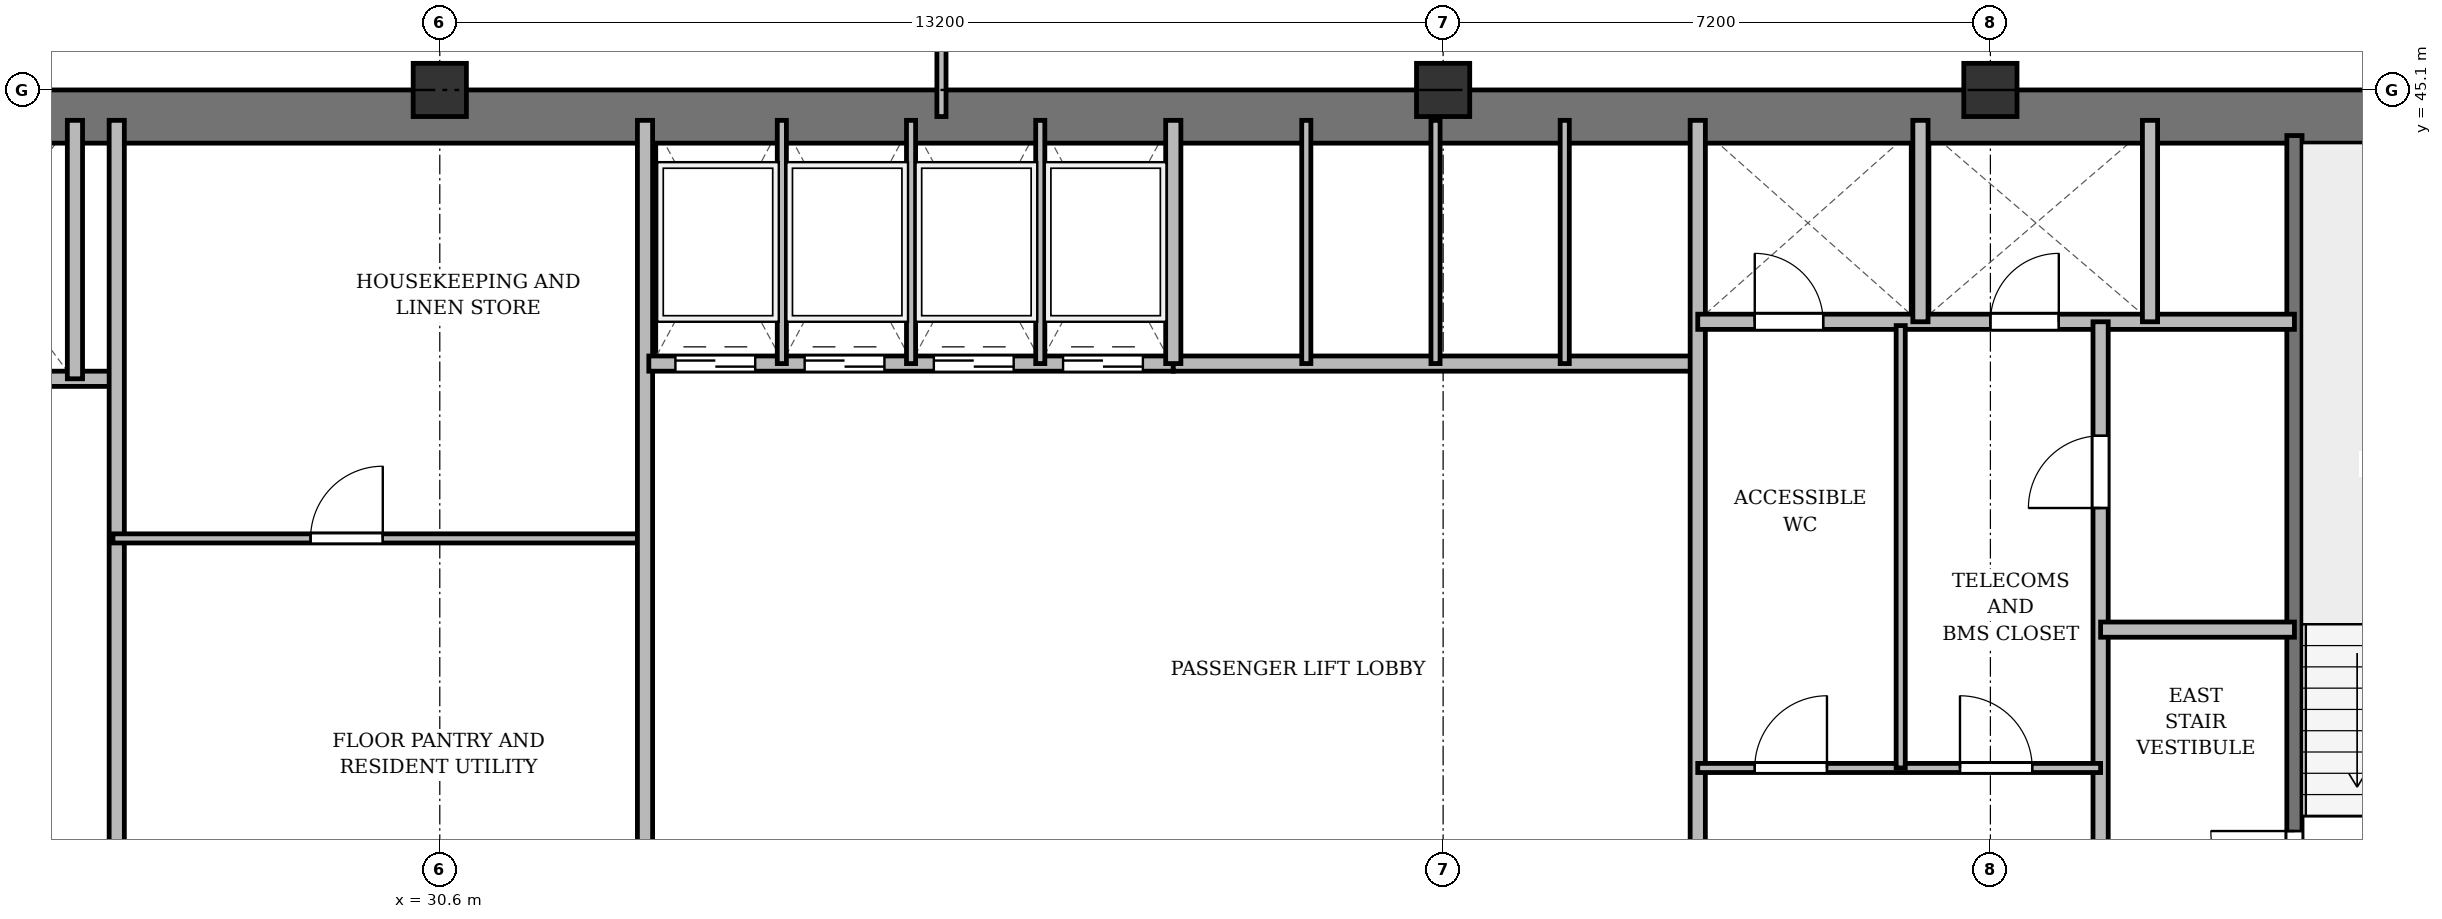
"""IFC4 building model, lengths in metres.
Left out: names, types, materials, properties, quantities, classifications, styles, units other than length and angle.
Written with IfcOpenShell. Run it as: python <this file> out.ifc"""

import sys

from ifc_helpers import new_model, si_unit, direction, frame, frame_2d, origin, origin_2d, place, context, subcontext, project, spatial, rectangle, extrude, source, transform, mapped, element, fill, save


model = new_model("IFC4")
c1 = context("Model", 3, precision=1e-05, world=origin(), true_north=direction((0.0, 1.0)))
c2 = subcontext(c1, "Body", "Model", "MODEL_VIEW")
j1 = project(units=[si_unit("LENGTHUNIT", "METRE"), si_unit("PLANEANGLEUNIT", "RADIAN")], contexts=[c1])
p1 = place(None, origin())
s1 = spatial("IfcSite", under=j1, at=p1, CompositionType="ELEMENT")
p2 = place(p1, origin())
s2 = spatial("IfcBuilding", under=s1, at=p2, CompositionType="ELEMENT")
p3 = place(p2, frame((0.0, 0.0, 139.3)))
s3 = spatial("IfcBuildingStorey", under=s2, at=p3, CompositionType="ELEMENT", Elevation=139.3)
m1 = source(origin(), c2, "Body", "SweptSolid", [
    extrude(rectangle(XDim=0.7, YDim=0.7, at=origin_2d()), origin(), (0.0, 0.0, 1.0), 3.6),
])
for number, where, z_axis, x_axis in (
    (1, (30.6, 45.1, 0.0), (0.0, 0.0, 1.0), (1.0, 0.0, 0.0)),
    (2, (43.8, 45.1, 0.0), (0.0, 0.0, 1.0), (1.0, 0.0, 0.0)),
    (3, (51.0, 45.1, 0.0), (0.0, 0.0, 1.0), (1.0, 0.0, 0.0)),
):
    element("IfcColumn", number, at=place(p3, frame(where, z_axis=z_axis, x_axis=x_axis)), inside=s3, PredefinedType="COLUMN", context=c2, shape_type="MappedRepresentation", body=[
        mapped(m1, transform((0.0, 0.0, 0.0), x_axis=(1.0, 0.0, 0.0), y_axis=(0.0, 1.0, 0.0), z_axis=(0.0, 0.0, 1.0), scale=1.0)),
    ])
p4 = place(p3, frame((15.5, 44.75, 0.0), z_axis=(0.0, 0.0, 1.0), x_axis=(1.0, 0.0, 0.0)))
e4 = element("IfcWall", 4, at=p4, inside=s3, PredefinedType="SHEAR", context=c2, shape_type="SweptSolid", body=[
    extrude(rectangle(XDim=43.4, YDim=0.7, at=frame_2d((21.7, 0.0))), origin(), (0.0, 0.0, 1.0), 3.35),
])
p5 = place(p3, frame((55.0, 33.4, 0.0), z_axis=(0.0, 0.0, 1.0), x_axis=(0.0, 1.0, 0.0)))
e5 = element("IfcWall", 5, at=p5, inside=s3, PredefinedType="SHEAR", context=c2, shape_type="SweptSolid", body=[
    extrude(rectangle(XDim=11.1, YDim=0.2, at=frame_2d((5.55, 0.0))), origin(), (0.0, 0.0, 1.0), 3.35),
])
p6 = place(p5, frame((0.85, 0.0, 0.0)))
e6 = element("IfcOpeningElement", 6, at=p6, cuts=e5, PredefinedType="OPENING", context=c2, shape_type="SweptSolid", body=[
    extrude(rectangle(XDim=1.1, YDim=2.15, at=frame_2d((0.55, 1.075))), frame((0.0, 0.11, 0.0), z_axis=(0.0, -1.0, 0.0), x_axis=(1.0, 0.0, 0.0)), (0.0, 0.0, 1.0), 0.22),
])
p7 = place(p3, frame((19.55, 41.3, 0.0), z_axis=(0.0, 0.0, 1.0), x_axis=(1.0, 0.0, 0.0)))
e7 = element("IfcWall", 7, at=p7, inside=s3, PredefinedType="SOLIDWALL", context=c2, shape_type="SweptSolid", body=[
    extrude(rectangle(XDim=6.75, YDim=0.2, at=frame_2d((3.375, 0.0))), origin(), (0.0, 0.0, 1.0), 3.35),
])
p8 = place(p7, frame((1.7, 0.0, 0.0)))
e8 = element("IfcOpeningElement", 8, at=p8, cuts=e7, PredefinedType="OPENING", context=c2, shape_type="SweptSolid", body=[
    extrude(rectangle(XDim=1.1, YDim=2.15, at=frame_2d((0.55, 1.075))), frame((0.0, 0.11, 0.0), z_axis=(0.0, -1.0, 0.0), x_axis=(1.0, 0.0, 0.0)), (0.0, 0.0, 1.0), 0.22),
])
p9 = place(p7, frame((4.4, 0.0, 0.0)))
e9 = element("IfcOpeningElement", 9, at=p9, cuts=e7, PredefinedType="OPENING", context=c2, shape_type="SweptSolid", body=[
    extrude(rectangle(XDim=1.1, YDim=2.15, at=frame_2d((0.55, 1.075))), frame((0.0, 0.11, 0.0), z_axis=(0.0, -1.0, 0.0), x_axis=(1.0, 0.0, 0.0)), (0.0, 0.0, 1.0), 0.22),
])
p10 = place(p3, frame((25.8, 41.3, 0.0), z_axis=(0.0, 0.0, 1.0), x_axis=(0.0, 1.0, 0.0)))
e10 = element("IfcWall", 10, at=p10, inside=s3, PredefinedType="SOLIDWALL", context=c2, shape_type="SweptSolid", body=[
    extrude(rectangle(XDim=3.4, YDim=0.2, at=frame_2d((1.7, 0.0))), origin(), (0.0, 0.0, 1.0), 3.35),
])
p11 = place(p3, frame((26.35, 33.4, 0.0), z_axis=(0.0, 0.0, 1.0), x_axis=(0.0, 1.0, 0.0)))
e11 = element("IfcWall", 11, at=p11, inside=s3, PredefinedType="SOLIDWALL", context=c2, shape_type="SweptSolid", body=[
    extrude(rectangle(XDim=11.3, YDim=0.2, at=frame_2d((5.65, 0.0))), origin(), (0.0, 0.0, 1.0), 2.75),
])
p12 = place(p3, frame((26.3, 39.2, 0.0), z_axis=(0.0, 0.0, 1.0), x_axis=(1.0, 0.0, 0.0)))
e12 = element("IfcWall", 12, at=p12, inside=s3, PredefinedType="PARTITIONING", context=c2, shape_type="SweptSolid", body=[
    extrude(rectangle(XDim=7.0, YDim=0.12, at=frame_2d((3.5, 0.0))), origin(), (0.0, 0.0, 1.0), 2.85),
])
p13 = place(p12, frame((2.6, 0.0, 0.0)))
e13 = element("IfcOpeningElement", 13, at=p13, cuts=e12, PredefinedType="OPENING", context=c2, shape_type="SweptSolid", body=[
    extrude(rectangle(XDim=0.95, YDim=2.15, at=frame_2d((0.475, 1.075))), frame((0.0, 0.07, 0.0), z_axis=(0.0, -1.0, 0.0), x_axis=(1.0, 0.0, 0.0)), (0.0, 0.0, 1.0), 0.14),
])
p14 = place(p3, frame((33.3, 33.4, 0.0), z_axis=(0.0, 0.0, 1.0), x_axis=(0.0, 1.0, 0.0)))
e14 = element("IfcWall", 14, at=p14, inside=s3, PredefinedType="SOLIDWALL", context=c2, shape_type="SweptSolid", body=[
    extrude(rectangle(XDim=11.3, YDim=0.2, at=frame_2d((5.65, 0.0))), origin(), (0.0, 0.0, 1.0), 2.75),
])
p15 = place(p3, frame((33.35, 41.5, 0.0), z_axis=(0.0, 0.0, 1.0), x_axis=(1.0, 0.0, 0.0)))
e15 = element("IfcWall", 15, at=p15, inside=s3, PredefinedType="SOLIDWALL", context=c2, shape_type="SweptSolid", body=[
    extrude(rectangle(XDim=6.9, YDim=0.2, at=frame_2d((3.45, 0.0))), origin(), (0.0, 0.0, 1.0), 3.35),
])
p16 = place(p15, frame((0.35, 0.0, 0.0)))
e16 = element("IfcOpeningElement", 16, at=p16, cuts=e15, PredefinedType="OPENING", context=c2, shape_type="SweptSolid", body=[
    extrude(rectangle(XDim=1.05, YDim=2.15, at=frame_2d((0.525, 1.075))), frame((0.0, 0.11, 0.0), z_axis=(0.0, -1.0, 0.0), x_axis=(1.0, 0.0, 0.0)), (0.0, 0.0, 1.0), 0.22),
])
p17 = place(p15, frame((2.05, 0.0, 0.0)))
e17 = element("IfcOpeningElement", 17, at=p17, cuts=e15, PredefinedType="OPENING", context=c2, shape_type="SweptSolid", body=[
    extrude(rectangle(XDim=1.05, YDim=2.15, at=frame_2d((0.525, 1.075))), frame((0.0, 0.11, 0.0), z_axis=(0.0, -1.0, 0.0), x_axis=(1.0, 0.0, 0.0)), (0.0, 0.0, 1.0), 0.22),
])
p18 = place(p15, frame((3.75, 0.0, 0.0)))
e18 = element("IfcOpeningElement", 18, at=p18, cuts=e15, PredefinedType="OPENING", context=c2, shape_type="SweptSolid", body=[
    extrude(rectangle(XDim=1.05, YDim=2.15, at=frame_2d((0.525, 1.075))), frame((0.0, 0.11, 0.0), z_axis=(0.0, -1.0, 0.0), x_axis=(1.0, 0.0, 0.0)), (0.0, 0.0, 1.0), 0.22),
])
p19 = place(p15, frame((5.45, 0.0, 0.0)))
e19 = element("IfcOpeningElement", 19, at=p19, cuts=e15, PredefinedType="OPENING", context=c2, shape_type="SweptSolid", body=[
    extrude(rectangle(XDim=1.05, YDim=2.15, at=frame_2d((0.525, 1.075))), frame((0.0, 0.11, 0.0), z_axis=(0.0, -1.0, 0.0), x_axis=(1.0, 0.0, 0.0)), (0.0, 0.0, 1.0), 0.22),
])
for number, where, z_axis, x_axis in (
    (20, (35.1, 41.5, 0.0), (0.0, 0.0, 1.0), (0.0, 1.0, 0.0)),
    (21, (36.8, 41.5, 0.0), (0.0, 0.0, 1.0), (0.0, 1.0, 0.0)),
    (22, (38.5, 41.5, 0.0), (0.0, 0.0, 1.0), (0.0, 1.0, 0.0)),
):
    element("IfcWall", number, at=place(p3, frame(where, z_axis=z_axis, x_axis=x_axis)), inside=s3, PredefinedType="PARTITIONING", context=c2, shape_type="SweptSolid", body=[
        extrude(rectangle(XDim=3.2, YDim=0.12, at=frame_2d((1.6, 0.0))), origin(), (0.0, 0.0, 1.0), 3.35),
    ])
p20 = place(p3, frame((40.25, 41.5, 0.0), z_axis=(0.0, 0.0, 1.0), x_axis=(1.0, 0.0, 0.0)))
e23 = element("IfcWall", 23, at=p20, inside=s3, PredefinedType="SOLIDWALL", context=c2, shape_type="SweptSolid", body=[
    extrude(rectangle(XDim=6.9, YDim=0.2, at=frame_2d((3.45, 0.0))), origin(), (0.0, 0.0, 1.0), 2.85),
])
p21 = place(p3, frame((40.25, 41.5, 0.0), z_axis=(0.0, 0.0, 1.0), x_axis=(0.0, 1.0, 0.0)))
e24 = element("IfcWall", 24, at=p21, inside=s3, PredefinedType="SOLIDWALL", context=c2, shape_type="SweptSolid", body=[
    extrude(rectangle(XDim=3.2, YDim=0.2, at=frame_2d((1.6, 0.0))), origin(), (0.0, 0.0, 1.0), 3.35),
])
p22 = place(p3, frame((42.0, 41.5, 0.0), z_axis=(0.0, 0.0, 1.0), x_axis=(0.0, 1.0, 0.0)))
e25 = element("IfcWall", 25, at=p22, inside=s3, PredefinedType="PARTITIONING", context=c2, shape_type="SweptSolid", body=[
    extrude(rectangle(XDim=3.2, YDim=0.12, at=frame_2d((1.6, 0.0))), origin(), (0.0, 0.0, 1.0), 3.35),
])
p23 = place(p3, frame((43.7, 41.5, 0.0), z_axis=(0.0, 0.0, 1.0), x_axis=(0.0, 1.0, 0.0)))
e26 = element("IfcWall", 26, at=p23, inside=s3, PredefinedType="PARTITIONING", context=c2, shape_type="SweptSolid", body=[
    extrude(rectangle(XDim=3.2, YDim=0.12, at=frame_2d((1.6, 0.0))), origin(), (0.0, 0.0, 1.0), 2.85),
])
p24 = place(p3, frame((45.4, 41.5, 0.0), z_axis=(0.0, 0.0, 1.0), x_axis=(0.0, 1.0, 0.0)))
e27 = element("IfcWall", 27, at=p24, inside=s3, PredefinedType="PARTITIONING", context=c2, shape_type="SweptSolid", body=[
    extrude(rectangle(XDim=3.2, YDim=0.12, at=frame_2d((1.6, 0.0))), origin(), (0.0, 0.0, 1.0), 3.35),
])
p25 = place(p3, frame((47.15, 33.4, 0.0), z_axis=(0.0, 0.0, 1.0), x_axis=(0.0, 1.0, 0.0)))
e28 = element("IfcWall", 28, at=p25, inside=s3, PredefinedType="SOLIDWALL", context=c2, shape_type="SweptSolid", body=[
    extrude(rectangle(XDim=11.3, YDim=0.2, at=frame_2d((5.65, 0.0))), origin(), (0.0, 0.0, 1.0), 2.75),
])
p26 = place(p3, frame((47.15, 42.05, 0.0), z_axis=(0.0, 0.0, 1.0), x_axis=(1.0, 0.0, 0.0)))
e29 = element("IfcWall", 29, at=p26, inside=s3, PredefinedType="SOLIDWALL", context=c2, shape_type="SweptSolid", body=[
    extrude(rectangle(XDim=7.85, YDim=0.2, at=frame_2d((3.925, 0.0))), origin(), (0.0, 0.0, 1.0), 2.85),
])
p27 = place(p26, frame((0.75, 0.0, 0.0)))
e30 = element("IfcOpeningElement", 30, at=p27, cuts=e29, PredefinedType="OPENING", context=c2, shape_type="SweptSolid", body=[
    extrude(rectangle(XDim=0.9, YDim=2.1, at=frame_2d((0.45, 1.05))), frame((0.0, 0.11, 0.0), z_axis=(0.0, -1.0, 0.0), x_axis=(1.0, 0.0, 0.0)), (0.0, 0.0, 1.0), 0.22),
])
p28 = place(p26, frame((3.85, 0.0, 0.0)))
e31 = element("IfcOpeningElement", 31, at=p28, cuts=e29, PredefinedType="OPENING", context=c2, shape_type="SweptSolid", body=[
    extrude(rectangle(XDim=0.9, YDim=2.1, at=frame_2d((0.45, 1.05))), frame((0.0, 0.11, 0.0), z_axis=(0.0, -1.0, 0.0), x_axis=(1.0, 0.0, 0.0)), (0.0, 0.0, 1.0), 0.22),
])
for number, where, z_axis, x_axis in (
    (32, (50.08, 42.05, 0.0), (0.0, 0.0, 1.0), (0.0, 1.0, 0.0)),
    (33, (53.1, 42.05, 0.0), (0.0, 0.0, 1.0), (0.0, 1.0, 0.0)),
):
    element("IfcWall", number, at=place(p3, frame(where, z_axis=z_axis, x_axis=x_axis)), inside=s3, PredefinedType="SOLIDWALL", context=c2, shape_type="SweptSolid", body=[
        extrude(rectangle(XDim=2.65, YDim=0.2, at=frame_2d((1.325, 0.0))), origin(), (0.0, 0.0, 1.0), 3.35),
    ])
p29 = place(p3, frame((52.45, 33.4, 0.0), z_axis=(0.0, 0.0, 1.0), x_axis=(0.0, 1.0, 0.0)))
e34 = element("IfcWall", 34, at=p29, inside=s3, PredefinedType="PARTITIONING", context=c2, shape_type="SweptSolid", body=[
    extrude(rectangle(XDim=8.65, YDim=0.2, at=frame_2d((4.325, 0.0))), origin(), (0.0, 0.0, 1.0), 2.75),
])
p30 = place(p29, frame((6.2, 0.0, 0.0)))
e35 = element("IfcOpeningElement", 35, at=p30, cuts=e34, PredefinedType="OPENING", context=c2, shape_type="SweptSolid", body=[
    extrude(rectangle(XDim=0.95, YDim=2.15, at=frame_2d((0.475, 1.075))), frame((0.0, 0.11, 0.0), z_axis=(0.0, -1.0, 0.0), x_axis=(1.0, 0.0, 0.0)), (0.0, 0.0, 1.0), 0.22),
])
p31 = place(p3, frame((52.45, 38.0, 0.0), z_axis=(0.0, 0.0, 1.0), x_axis=(1.0, 0.0, 0.0)))
e36 = element("IfcWall", 36, at=p31, inside=s3, PredefinedType="PARTITIONING", context=c2, shape_type="SweptSolid", body=[
    extrude(rectangle(XDim=2.55, YDim=0.2, at=frame_2d((1.275, 0.0))), origin(), (0.0, 0.0, 1.0), 3.35),
])
p32 = place(p3, frame((47.15, 36.18, 0.0), z_axis=(0.0, 0.0, 1.0), x_axis=(1.0, 0.0, 0.0)))
e37 = element("IfcWall", 37, at=p32, inside=s3, PredefinedType="PARTITIONING", context=c2, shape_type="SweptSolid", body=[
    extrude(rectangle(XDim=5.3, YDim=0.12, at=frame_2d((2.65, 0.0))), origin(), (0.0, 0.0, 1.0), 2.85),
])
p33 = place(p32, frame((0.75, 0.0, 0.0)))
e38 = element("IfcOpeningElement", 38, at=p33, cuts=e37, PredefinedType="OPENING", context=c2, shape_type="SweptSolid", body=[
    extrude(rectangle(XDim=0.95, YDim=2.15, at=frame_2d((0.475, 1.075))), frame((0.0, 0.07, 0.0), z_axis=(0.0, -1.0, 0.0), x_axis=(1.0, 0.0, 0.0)), (0.0, 0.0, 1.0), 0.14),
])
p34 = place(p32, frame((3.45, 0.0, 0.0)))
e39 = element("IfcOpeningElement", 39, at=p34, cuts=e37, PredefinedType="OPENING", context=c2, shape_type="SweptSolid", body=[
    extrude(rectangle(XDim=0.95, YDim=2.15, at=frame_2d((0.475, 1.075))), frame((0.0, 0.07, 0.0), z_axis=(0.0, -1.0, 0.0), x_axis=(1.0, 0.0, 0.0)), (0.0, 0.0, 1.0), 0.14),
])
p35 = place(p3, frame((49.82, 36.18, 0.0), z_axis=(0.0, 0.0, 1.0), x_axis=(0.0, 1.0, 0.0)))
e40 = element("IfcWall", 40, at=p35, inside=s3, PredefinedType="PARTITIONING", context=c2, shape_type="SweptSolid", body=[
    extrude(rectangle(XDim=5.82, YDim=0.12, at=frame_2d((2.91, 0.0))), origin(), (0.0, 0.0, 1.0), 3.35),
])
p36 = place(p3, frame((37.2, 44.75, 0.0), z_axis=(0.0, 0.0, 1.0), x_axis=(0.0, 1.0, 0.0)))
e41 = element("IfcWall", 41, at=p36, inside=s3, PredefinedType="PARTITIONING", context=c2, shape_type="SweptSolid", body=[
    extrude(rectangle(XDim=3.61, YDim=0.12, at=frame_2d((1.805, 0.0))), origin(), (0.0, 0.0, 1.0), 2.75),
])
p37 = place(p36, frame((1.1, 0.0, 0.0)))
e42 = element("IfcOpeningElement", 42, at=p37, cuts=e41, PredefinedType="OPENING", context=c2, shape_type="SweptSolid", body=[
    extrude(rectangle(XDim=0.95, YDim=2.15, at=frame_2d((0.475, 1.075))), frame((0.0, 0.07, 0.0), z_axis=(0.0, -1.0, 0.0), x_axis=(1.0, 0.0, 0.0)), (0.0, 0.0, 1.0), 0.14),
])
m2 = source(origin(), c2, "Body", "SweptSolid", [
    extrude(rectangle(XDim=1.1, YDim=2.15, at=frame_2d((0.55, 1.075))), frame((0.0, 0.025, 0.0), z_axis=(0.0, -1.0, 0.0), x_axis=(1.0, 0.0, 0.0)), (0.0, 0.0, 1.0), 0.05),
])
p38 = place(p6, origin())
e43 = element("IfcDoor", 43, at=p38, inside=s3, OperationType="SINGLE_SWING_RIGHT", PredefinedType="DOOR", context=c2, shape_type="MappedRepresentation", body=[
    mapped(m2, transform((0.0, 0.0, 0.0), x_axis=(1.0, 0.0, 0.0), y_axis=(0.0, 1.0, 0.0), z_axis=(0.0, 0.0, 1.0), scale=1.0)),
])
fill(e6, e43)
m3 = source(origin(), c2, "Body", "SweptSolid", [
    extrude(rectangle(XDim=0.95, YDim=2.15, at=frame_2d((0.475, 1.075))), frame((0.0, 0.025, 0.0), z_axis=(0.0, -1.0, 0.0), x_axis=(1.0, 0.0, 0.0)), (0.0, 0.0, 1.0), 0.05),
])
p39 = place(p13, origin())
e44 = element("IfcDoor", 44, at=p39, inside=s3, OperationType="SINGLE_SWING_RIGHT", PredefinedType="DOOR", context=c2, shape_type="MappedRepresentation", body=[
    mapped(m3, transform((0.0, 0.0, 0.0), x_axis=(1.0, 0.0, 0.0), y_axis=(0.0, 1.0, 0.0), z_axis=(0.0, 0.0, 1.0), scale=1.0)),
])
fill(e13, e44)
m4 = source(origin(), c2, "Body", "SweptSolid", [
    extrude(rectangle(XDim=1.05, YDim=2.15, at=frame_2d((0.525, 1.075))), frame((0.0, 0.025, 0.0), z_axis=(0.0, -1.0, 0.0), x_axis=(1.0, 0.0, 0.0)), (0.0, 0.0, 1.0), 0.05),
])
p40 = place(p16, origin())
e45 = element("IfcDoor", 45, at=p40, inside=s3, OperationType="DOUBLE_DOOR_SLIDING", PredefinedType="DOOR", context=c2, shape_type="MappedRepresentation", body=[
    mapped(m4, transform((0.0, 0.0, 0.0), x_axis=(1.0, 0.0, 0.0), y_axis=(0.0, 1.0, 0.0), z_axis=(0.0, 0.0, 1.0), scale=1.0)),
])
fill(e16, e45)
p41 = place(p17, origin())
e46 = element("IfcDoor", 46, at=p41, inside=s3, OperationType="DOUBLE_DOOR_SLIDING", PredefinedType="DOOR", context=c2, shape_type="MappedRepresentation", body=[
    mapped(m4, transform((0.0, 0.0, 0.0), x_axis=(1.0, 0.0, 0.0), y_axis=(0.0, 1.0, 0.0), z_axis=(0.0, 0.0, 1.0), scale=1.0)),
])
fill(e17, e46)
p42 = place(p18, origin())
e47 = element("IfcDoor", 47, at=p42, inside=s3, OperationType="DOUBLE_DOOR_SLIDING", PredefinedType="DOOR", context=c2, shape_type="MappedRepresentation", body=[
    mapped(m4, transform((0.0, 0.0, 0.0), x_axis=(1.0, 0.0, 0.0), y_axis=(0.0, 1.0, 0.0), z_axis=(0.0, 0.0, 1.0), scale=1.0)),
])
fill(e18, e47)
p43 = place(p19, origin())
e48 = element("IfcDoor", 48, at=p43, inside=s3, OperationType="DOUBLE_DOOR_SLIDING", PredefinedType="DOOR", context=c2, shape_type="MappedRepresentation", body=[
    mapped(m4, transform((0.0, 0.0, 0.0), x_axis=(1.0, 0.0, 0.0), y_axis=(0.0, 1.0, 0.0), z_axis=(0.0, 0.0, 1.0), scale=1.0)),
])
fill(e19, e48)
m5 = source(origin(), c2, "Body", "SweptSolid", [
    extrude(rectangle(XDim=0.9, YDim=2.1, at=frame_2d((0.45, 1.05))), frame((0.0, 0.025, 0.0), z_axis=(0.0, -1.0, 0.0), x_axis=(1.0, 0.0, 0.0)), (0.0, 0.0, 1.0), 0.05),
])
p44 = place(p27, origin())
e49 = element("IfcDoor", 49, at=p44, inside=s3, OperationType="SINGLE_SWING_LEFT", PredefinedType="DOOR", context=c2, shape_type="MappedRepresentation", body=[
    mapped(m5, transform((0.0, 0.0, 0.0), x_axis=(1.0, 0.0, 0.0), y_axis=(0.0, 1.0, 0.0), z_axis=(0.0, 0.0, 1.0), scale=1.0)),
])
fill(e30, e49)
p45 = place(p28, origin())
e50 = element("IfcDoor", 50, at=p45, inside=s3, OperationType="SINGLE_SWING_RIGHT", PredefinedType="DOOR", context=c2, shape_type="MappedRepresentation", body=[
    mapped(m5, transform((0.0, 0.0, 0.0), x_axis=(1.0, 0.0, 0.0), y_axis=(0.0, 1.0, 0.0), z_axis=(0.0, 0.0, 1.0), scale=1.0)),
])
fill(e31, e50)
p46 = place(p30, origin())
e51 = element("IfcDoor", 51, at=p46, inside=s3, OperationType="SINGLE_SWING_LEFT", PredefinedType="DOOR", context=c2, shape_type="MappedRepresentation", body=[
    mapped(m3, transform((0.0, 0.0, 0.0), x_axis=(1.0, 0.0, 0.0), y_axis=(0.0, 1.0, 0.0), z_axis=(0.0, 0.0, 1.0), scale=1.0)),
])
fill(e35, e51)
p47 = place(p33, origin())
e52 = element("IfcDoor", 52, at=p47, inside=s3, OperationType="SINGLE_SWING_RIGHT", PredefinedType="DOOR", context=c2, shape_type="MappedRepresentation", body=[
    mapped(m3, transform((0.0, 0.0, 0.0), x_axis=(1.0, 0.0, 0.0), y_axis=(0.0, 1.0, 0.0), z_axis=(0.0, 0.0, 1.0), scale=1.0)),
])
fill(e38, e52)
p48 = place(p34, origin())
e53 = element("IfcDoor", 53, at=p48, inside=s3, OperationType="SINGLE_SWING_LEFT", PredefinedType="DOOR", context=c2, shape_type="MappedRepresentation", body=[
    mapped(m3, transform((0.0, 0.0, 0.0), x_axis=(1.0, 0.0, 0.0), y_axis=(0.0, 1.0, 0.0), z_axis=(0.0, 0.0, 1.0), scale=1.0)),
])
fill(e39, e53)
save(model, sys.argv[1])
